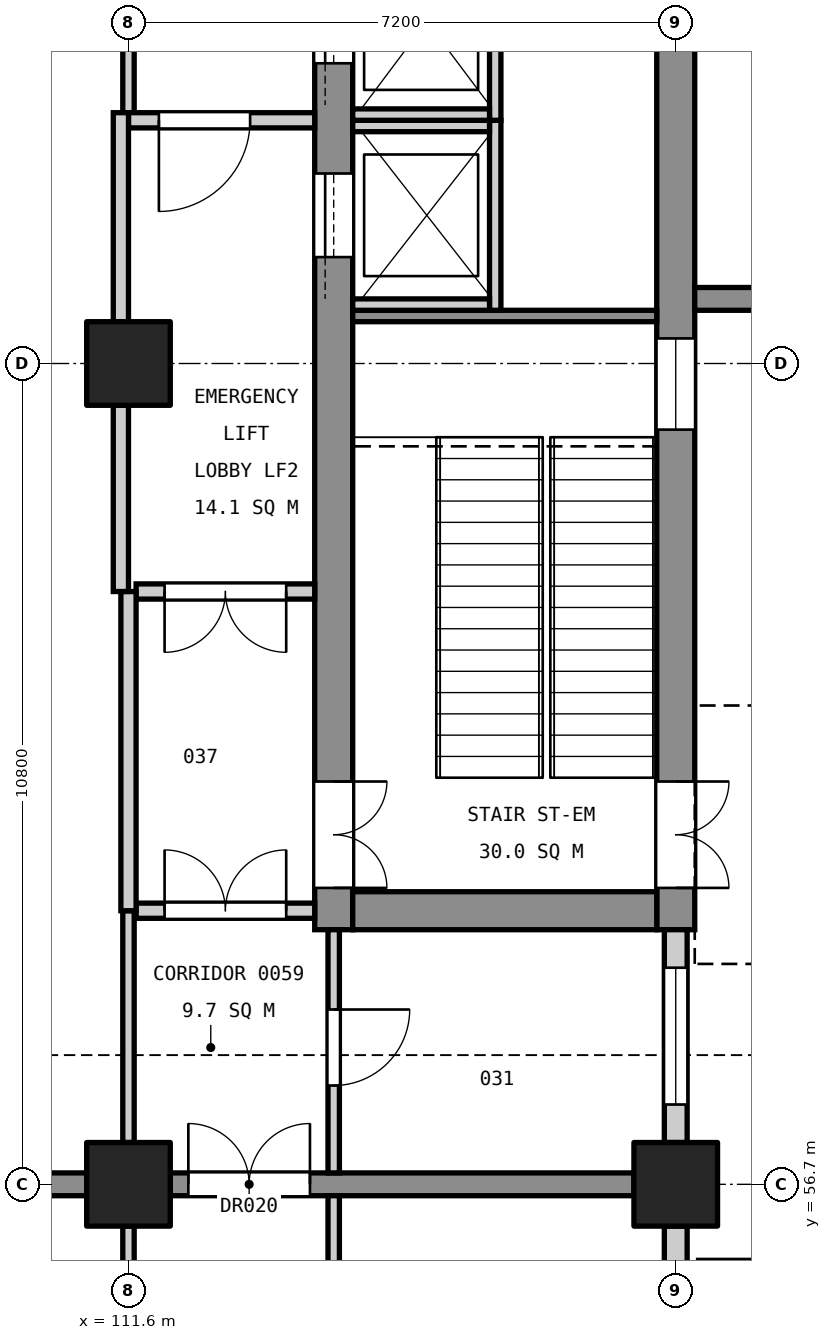
"""IFC4 building model, lengths in metres.
Left out: names, types, materials, properties, quantities, classifications, styles, units other than length and angle.
Written with IfcOpenShell. Run it as: python <this file> out.ifc"""

import sys

from ifc_helpers import new_model, si_unit, direction, frame, frame_2d, origin, origin_2d, place, context, subcontext, project, spatial, rectangle, extrude, element, fill, save


model = new_model("IFC4")
c1 = context("Model", 3, precision=1e-05, world=origin(), true_north=direction((0.0, 1.0)))
c2 = subcontext(c1, "Body", "Model", "MODEL_VIEW")
j1 = project(units=[si_unit("LENGTHUNIT", "METRE"), si_unit("PLANEANGLEUNIT", "RADIAN")], contexts=[c1])
p1 = place(None, origin())
s1 = spatial("IfcSite", under=j1, at=p1, CompositionType="ELEMENT")
p2 = place(p1, origin())
s2 = spatial("IfcBuilding", under=s1, at=p2, CompositionType="ELEMENT")
p3 = place(p2, origin())
s3 = spatial("IfcBuildingStorey", under=s2, at=p3, CompositionType="ELEMENT", Elevation=0.0)
for number, where, z_axis, x_axis in (
    (1, (118.8, 56.7, 0.0), (0.0, 0.0, 1.0), (1.0, 0.0, 0.0)),
    (2, (111.6, 56.7, 0.0), (0.0, 0.0, 1.0), (1.0, 0.0, 0.0)),
    (3, (111.6, 67.5, 0.0), (0.0, 0.0, 1.0), (1.0, 0.0, 0.0)),
):
    element("IfcColumn", number, at=place(p3, frame(where, z_axis=z_axis, x_axis=x_axis)), inside=s3, PredefinedType="COLUMN", context=c2, shape_type="SweptSolid", body=[
        extrude(rectangle(XDim=1.1, YDim=1.1, at=origin_2d()), origin(), (0.0, 0.0, 1.0), 6.0),
    ])
p4 = place(p3, frame((118.8, 60.05, 0.0), z_axis=(0.0, 0.0, 1.0), x_axis=(0.0, 1.0, 0.0)))
e4 = element("IfcWall", 4, at=p4, inside=s3, PredefinedType="SHEAR", context=c2, shape_type="SweptSolid", body=[
    extrude(rectangle(XDim=14.9, YDim=0.5, at=frame_2d((7.45, 0.0))), origin(), (0.0, 0.0, 1.0), 5.7),
])
p5 = place(p4, frame((0.55, 0.0, 0.0)))
e5 = element("IfcOpeningElement", 5, at=p5, cuts=e4, PredefinedType="OPENING", context=c2, shape_type="SweptSolid", body=[
    extrude(rectangle(XDim=1.4, YDim=2.1, at=frame_2d((0.7, 1.05))), frame((0.0, 0.26, 0.0), z_axis=(0.0, -1.0, 0.0), x_axis=(1.0, 0.0, 0.0)), (0.0, 0.0, 1.0), 0.52),
])
p6 = place(p4, frame((6.58, 0.0, 3.4)))
e6 = element("IfcOpeningElement", 6, at=p6, cuts=e4, PredefinedType="OPENING", context=c2, shape_type="SweptSolid", body=[
    extrude(rectangle(XDim=1.2, YDim=0.9, at=frame_2d((0.6, 0.45))), frame((0.0, 0.26, 0.0), z_axis=(0.0, -1.0, 0.0), x_axis=(1.0, 0.0, 0.0)), (0.0, 0.0, 1.0), 0.52),
])
p7 = place(p3, frame((114.3, 60.05, 0.0), z_axis=(0.0, 0.0, 1.0), x_axis=(0.0, 1.0, 0.0)))
e7 = element("IfcWall", 7, at=p7, inside=s3, PredefinedType="SHEAR", context=c2, shape_type="SweptSolid", body=[
    extrude(rectangle(XDim=14.9, YDim=0.5, at=frame_2d((7.45, 0.0))), origin(), (0.0, 0.0, 1.0), 5.7),
])
p8 = place(p7, frame((0.55, 0.0, 0.0)))
e8 = element("IfcOpeningElement", 8, at=p8, cuts=e7, PredefinedType="OPENING", context=c2, shape_type="SweptSolid", body=[
    extrude(rectangle(XDim=1.4, YDim=2.1, at=frame_2d((0.7, 1.05))), frame((0.0, 0.26, 0.0), z_axis=(0.0, -1.0, 0.0), x_axis=(1.0, 0.0, 0.0)), (0.0, 0.0, 1.0), 0.52),
])
p9 = place(p7, frame((8.85, 0.0, 0.0)))
e9 = element("IfcOpeningElement", 9, at=p9, cuts=e7, PredefinedType="OPENING", context=c2, shape_type="SweptSolid", body=[
    extrude(rectangle(XDim=1.1, YDim=2.1, at=frame_2d((0.55, 1.05))), frame((0.0, 0.26, 0.0), z_axis=(0.0, -1.0, 0.0), x_axis=(1.0, 0.0, 0.0)), (0.0, 0.0, 1.0), 0.52),
])
p10 = place(p7, frame((11.4, 0.0, 0.0)))
e10 = element("IfcOpeningElement", 10, at=p10, cuts=e7, PredefinedType="OPENING", context=c2, shape_type="SweptSolid", body=[
    extrude(rectangle(XDim=1.1, YDim=2.1, at=frame_2d((0.55, 1.05))), frame((0.0, 0.26, 0.0), z_axis=(0.0, -1.0, 0.0), x_axis=(1.0, 0.0, 0.0)), (0.0, 0.0, 1.0), 0.52),
])
p11 = place(p3, frame((118.55, 60.3, 0.0), z_axis=(0.0, 0.0, 1.0), x_axis=(-1.0, 0.0, 0.0)))
e11 = element("IfcWall", 11, at=p11, inside=s3, PredefinedType="SHEAR", context=c2, shape_type="SweptSolid", body=[
    extrude(rectangle(XDim=4.0, YDim=0.5, at=frame_2d((2.0, 0.0))), origin(), (0.0, 0.0, 1.0), 5.7),
])
p12 = place(p3, frame((119.05, 68.35, 0.0), z_axis=(0.0, 0.0, 1.0), x_axis=(1.0, 0.0, 0.0)))
e12 = element("IfcWall", 12, at=p12, inside=s3, PredefinedType="SHEAR", context=c2, shape_type="SweptSolid", body=[
    extrude(rectangle(XDim=1.25, YDim=0.3, at=frame_2d((0.625, 0.0))), origin(), (0.0, 0.0, 1.0), 6.0),
])
p13 = place(p3, frame((118.25, 56.7, 0.0), z_axis=(0.0, 0.0, 1.0), x_axis=(-1.0, 0.0, 0.0)))
e13 = element("IfcWall", 13, at=p13, inside=s3, PredefinedType="SHEAR", context=c2, shape_type="SweptSolid", body=[
    extrude(rectangle(XDim=6.1, YDim=0.3, at=frame_2d((3.05, 0.0))), origin(), (0.0, 0.0, 1.0), 5.7),
])
p14 = place(p13, frame((4.262, 0.0, 0.0)))
e14 = element("IfcOpeningElement", 14, at=p14, cuts=e13, PredefinedType="OPENING", context=c2, shape_type="SweptSolid", body=[
    extrude(rectangle(XDim=1.6, YDim=2.1, at=frame_2d((0.8, 1.05))), frame((0.0, 0.16, 0.0), z_axis=(0.0, -1.0, 0.0), x_axis=(1.0, 0.0, 0.0)), (0.0, 0.0, 1.0), 0.32),
])
p15 = place(p3, frame((111.05, 56.7, 0.0), z_axis=(0.0, 0.0, 1.0), x_axis=(-1.0, 0.0, 0.0)))
e15 = element("IfcWall", 15, at=p15, inside=s3, PredefinedType="SHEAR", context=c2, shape_type="SweptSolid", body=[
    extrude(rectangle(XDim=9.7, YDim=0.3, at=frame_2d((4.85, 0.0))), origin(), (0.0, 0.0, 1.0), 5.7),
])
p16 = place(p3, frame((118.55, 68.125, 0.0), z_axis=(0.0, 0.0, 1.0), x_axis=(-1.0, 0.0, 0.0)))
e16 = element("IfcWall", 16, at=p16, inside=s3, PredefinedType="SOLIDWALL", context=c2, shape_type="SweptSolid", body=[
    extrude(rectangle(XDim=4.0, YDim=0.15, at=frame_2d((2.0, 0.0))), origin(), (0.0, 0.0, 1.0), 5.7),
])
p17 = place(p3, frame((116.425, 68.2, 0.0), z_axis=(0.0, 0.0, 1.0), x_axis=(0.0, 1.0, 0.0)))
e17 = element("IfcWall", 17, at=p17, inside=s3, PredefinedType="SOLIDWALL", context=c2, shape_type="SweptSolid", body=[
    extrude(rectangle(XDim=2.5, YDim=0.15, at=frame_2d((1.25, 0.0))), origin(), (0.0, 0.0, 1.0), 6.0),
])
for number, where, z_axis, x_axis in (
    (18, (116.35, 68.275, 0.0), (0.0, 0.0, 1.0), (-1.0, 0.0, 0.0)),
    (19, (116.35, 70.625, 0.0), (0.0, 0.0, 1.0), (-1.0, 0.0, 0.0)),
):
    element("IfcWall", number, at=place(p3, frame(where, z_axis=z_axis, x_axis=x_axis)), inside=s3, PredefinedType="SOLIDWALL", context=c2, shape_type="SweptSolid", body=[
        extrude(rectangle(XDim=1.8, YDim=0.15, at=frame_2d((0.9, 0.0))), origin(), (0.0, 0.0, 1.0), 6.0),
    ])
p18 = place(p3, frame((116.425, 70.7, 0.0), z_axis=(0.0, 0.0, 1.0), x_axis=(0.0, 1.0, 0.0)))
e20 = element("IfcWall", 20, at=p18, inside=s3, PredefinedType="SOLIDWALL", context=c2, shape_type="SweptSolid", body=[
    extrude(rectangle(XDim=2.6, YDim=0.15, at=frame_2d((1.3, 0.0))), origin(), (0.0, 0.0, 1.0), 6.0),
])
p19 = place(p3, frame((116.35, 70.775, 0.0), z_axis=(0.0, 0.0, 1.0), x_axis=(-1.0, 0.0, 0.0)))
e21 = element("IfcWall", 21, at=p19, inside=s3, PredefinedType="SOLIDWALL", context=c2, shape_type="SweptSolid", body=[
    extrude(rectangle(XDim=1.8, YDim=0.15, at=frame_2d((0.9, 0.0))), origin(), (0.0, 0.0, 1.0), 6.0),
])
p20 = place(p3, frame((118.8, 46.15, 0.0), z_axis=(0.0, 0.0, 1.0), x_axis=(0.0, 1.0, 0.0)))
e22 = element("IfcWall", 22, at=p20, inside=s3, PredefinedType="STANDARD", context=c2, shape_type="SweptSolid", body=[
    extrude(rectangle(XDim=10.0, YDim=0.3, at=frame_2d((5.0, 0.0))), origin(), (0.0, 0.0, 1.0), 4.7),
])
p21 = place(p20, frame((0.775, 0.0, 0.9)))
e23 = element("IfcOpeningElement", 23, at=p21, cuts=e22, PredefinedType="OPENING", context=c2, shape_type="SweptSolid", body=[
    extrude(rectangle(XDim=1.8, YDim=3.0, at=frame_2d((0.9, 1.5))), frame((0.0, 0.16, 0.0), z_axis=(0.0, -1.0, 0.0), x_axis=(1.0, 0.0, 0.0)), (0.0, 0.0, 1.0), 0.32),
])
p22 = place(p20, frame((4.25, 0.0, 0.9)))
e24 = element("IfcOpeningElement", 24, at=p22, cuts=e22, PredefinedType="OPENING", context=c2, shape_type="SweptSolid", body=[
    extrude(rectangle(XDim=1.8, YDim=3.0, at=frame_2d((0.9, 1.5))), frame((0.0, 0.16, 0.0), z_axis=(0.0, -1.0, 0.0), x_axis=(1.0, 0.0, 0.0)), (0.0, 0.0, 1.0), 0.32),
])
p23 = place(p20, frame((7.575, 0.0, 0.9)))
e25 = element("IfcOpeningElement", 25, at=p23, cuts=e22, PredefinedType="OPENING", context=c2, shape_type="SweptSolid", body=[
    extrude(rectangle(XDim=1.8, YDim=3.0, at=frame_2d((0.9, 1.5))), frame((0.0, 0.16, 0.0), z_axis=(0.0, -1.0, 0.0), x_axis=(1.0, 0.0, 0.0)), (0.0, 0.0, 1.0), 0.32),
])
p24 = place(p3, frame((118.8, 57.25, 0.0), z_axis=(0.0, 0.0, 1.0), x_axis=(0.0, 1.0, 0.0)))
e26 = element("IfcWall", 26, at=p24, inside=s3, PredefinedType="STANDARD", context=c2, shape_type="SweptSolid", body=[
    extrude(rectangle(XDim=2.8, YDim=0.3, at=frame_2d((1.4, 0.0))), origin(), (0.0, 0.0, 1.0), 4.7),
])
p25 = place(p24, frame((0.5, 0.0, 0.9)))
e27 = element("IfcOpeningElement", 27, at=p25, cuts=e26, PredefinedType="OPENING", context=c2, shape_type="SweptSolid", body=[
    extrude(rectangle(XDim=1.8, YDim=3.0, at=frame_2d((0.9, 1.5))), frame((0.0, 0.16, 0.0), z_axis=(0.0, -1.0, 0.0), x_axis=(1.0, 0.0, 0.0)), (0.0, 0.0, 1.0), 0.32),
])
p26 = place(p3, frame((114.3, 46.15, 0.0), z_axis=(0.0, 0.0, 1.0), x_axis=(0.0, 1.0, 0.0)))
e28 = element("IfcWall", 28, at=p26, inside=s3, PredefinedType="PARTITIONING", context=c2, shape_type="SweptSolid", body=[
    extrude(rectangle(XDim=10.4, YDim=0.15, at=frame_2d((5.2, 0.0))), origin(), (0.0, 0.0, 1.0), 4.6),
])
p27 = place(p26, frame((4.65, 0.0, 0.0)))
e29 = element("IfcOpeningElement", 29, at=p27, cuts=e28, PredefinedType="OPENING", context=c2, shape_type="SweptSolid", body=[
    extrude(rectangle(XDim=1.0, YDim=2.1, at=frame_2d((0.5, 1.05))), frame((0.0, 0.085, 0.0), z_axis=(0.0, -1.0, 0.0), x_axis=(1.0, 0.0, 0.0)), (0.0, 0.0, 1.0), 0.17),
])
p28 = place(p26, frame((1.05, 0.0, 0.0)))
e30 = element("IfcOpeningElement", 30, at=p28, cuts=e28, PredefinedType="OPENING", context=c2, shape_type="SweptSolid", body=[
    extrude(rectangle(XDim=1.0, YDim=2.1, at=frame_2d((0.5, 1.05))), frame((0.0, 0.085, 0.0), z_axis=(0.0, -1.0, 0.0), x_axis=(1.0, 0.0, 0.0)), (0.0, 0.0, 1.0), 0.17),
])
p29 = place(p26, frame((8.25, 0.0, 0.0)))
e31 = element("IfcOpeningElement", 31, at=p29, cuts=e28, PredefinedType="OPENING", context=c2, shape_type="SweptSolid", body=[
    extrude(rectangle(XDim=1.0, YDim=2.1, at=frame_2d((0.5, 1.05))), frame((0.0, 0.085, 0.0), z_axis=(0.0, -1.0, 0.0), x_axis=(1.0, 0.0, 0.0)), (0.0, 0.0, 1.0), 0.17),
])
p30 = place(p3, frame((114.3, 56.85, 0.0), z_axis=(0.0, 0.0, 1.0), x_axis=(0.0, 1.0, 0.0)))
e32 = element("IfcWall", 32, at=p30, inside=s3, PredefinedType="PARTITIONING", context=c2, shape_type="SweptSolid", body=[
    extrude(rectangle(XDim=3.2, YDim=0.15, at=frame_2d((1.6, 0.0))), origin(), (0.0, 0.0, 1.0), 4.6),
])
p31 = place(p30, frame((1.15, 0.0, 0.0)))
e33 = element("IfcOpeningElement", 33, at=p31, cuts=e32, PredefinedType="OPENING", context=c2, shape_type="SweptSolid", body=[
    extrude(rectangle(XDim=1.0, YDim=2.1, at=frame_2d((0.5, 1.05))), frame((0.0, 0.085, 0.0), z_axis=(0.0, -1.0, 0.0), x_axis=(1.0, 0.0, 0.0)), (0.0, 0.0, 1.0), 0.17),
])
p32 = place(p3, frame((114.05, 60.3, 0.0), z_axis=(0.0, 0.0, 1.0), x_axis=(-1.0, 0.0, 0.0)))
e34 = element("IfcWall", 34, at=p32, inside=s3, PredefinedType="PARTITIONING", context=c2, shape_type="SweptSolid", body=[
    extrude(rectangle(XDim=2.35, YDim=0.2, at=frame_2d((1.175, 0.0))), origin(), (0.0, 0.0, 1.0), 4.9),
])
p33 = place(p32, frame((0.375, 0.0, 0.0)))
e35 = element("IfcOpeningElement", 35, at=p33, cuts=e34, PredefinedType="OPENING", context=c2, shape_type="SweptSolid", body=[
    extrude(rectangle(XDim=1.6, YDim=2.1, at=frame_2d((0.8, 1.05))), frame((0.0, 0.11, 0.0), z_axis=(0.0, -1.0, 0.0), x_axis=(1.0, 0.0, 0.0)), (0.0, 0.0, 1.0), 0.22),
])
p34 = place(p3, frame((114.05, 64.5, 0.0), z_axis=(0.0, 0.0, 1.0), x_axis=(-1.0, 0.0, 0.0)))
e36 = element("IfcWall", 36, at=p34, inside=s3, PredefinedType="PARTITIONING", context=c2, shape_type="SweptSolid", body=[
    extrude(rectangle(XDim=2.35, YDim=0.2, at=frame_2d((1.175, 0.0))), origin(), (0.0, 0.0, 1.0), 4.6),
])
p35 = place(p34, frame((0.375, 0.0, 0.0)))
e37 = element("IfcOpeningElement", 37, at=p35, cuts=e36, PredefinedType="OPENING", context=c2, shape_type="SweptSolid", body=[
    extrude(rectangle(XDim=1.6, YDim=2.1, at=frame_2d((0.8, 1.05))), frame((0.0, 0.11, 0.0), z_axis=(0.0, -1.0, 0.0), x_axis=(1.0, 0.0, 0.0)), (0.0, 0.0, 1.0), 0.22),
])
p36 = place(p3, frame((111.6, 46.45, 0.0), z_axis=(0.0, 0.0, 1.0), x_axis=(0.0, 1.0, 0.0)))
e38 = element("IfcWall", 38, at=p36, inside=s3, PredefinedType="PARTITIONING", context=c2, shape_type="SweptSolid", body=[
    extrude(rectangle(XDim=9.7, YDim=0.15, at=frame_2d((4.85, 0.0))), origin(), (0.0, 0.0, 1.0), 4.6),
])
p37 = place(p36, frame((4.25, 0.0, 0.0)))
e39 = element("IfcOpeningElement", 39, at=p37, cuts=e38, PredefinedType="OPENING", context=c2, shape_type="SweptSolid", body=[
    extrude(rectangle(XDim=1.2, YDim=2.1, at=frame_2d((0.6, 1.05))), frame((0.0, 0.085, 0.0), z_axis=(0.0, -1.0, 0.0), x_axis=(1.0, 0.0, 0.0)), (0.0, 0.0, 1.0), 0.17),
])
p38 = place(p36, frame((0.925, 0.0, 0.0)))
e40 = element("IfcOpeningElement", 40, at=p38, cuts=e38, PredefinedType="OPENING", context=c2, shape_type="SweptSolid", body=[
    extrude(rectangle(XDim=1.2, YDim=2.1, at=frame_2d((0.6, 1.05))), frame((0.0, 0.085, 0.0), z_axis=(0.0, -1.0, 0.0), x_axis=(1.0, 0.0, 0.0)), (0.0, 0.0, 1.0), 0.17),
])
p39 = place(p36, frame((7.575, 0.0, 0.0)))
e41 = element("IfcOpeningElement", 41, at=p39, cuts=e38, PredefinedType="OPENING", context=c2, shape_type="SweptSolid", body=[
    extrude(rectangle(XDim=1.2, YDim=2.1, at=frame_2d((0.6, 1.05))), frame((0.0, 0.085, 0.0), z_axis=(0.0, -1.0, 0.0), x_axis=(1.0, 0.0, 0.0)), (0.0, 0.0, 1.0), 0.17),
])
p40 = place(p3, frame((111.6, 57.25, 0.0), z_axis=(0.0, 0.0, 1.0), x_axis=(0.0, 1.0, 0.0)))
e42 = element("IfcWall", 42, at=p40, inside=s3, PredefinedType="PARTITIONING", context=c2, shape_type="SweptSolid", body=[
    extrude(rectangle(XDim=3.05, YDim=0.15, at=frame_2d((1.525, 0.0))), origin(), (0.0, 0.0, 1.0), 4.6),
])
p41 = place(p3, frame((111.6, 60.3, 0.0), z_axis=(0.0, 0.0, 1.0), x_axis=(0.0, 1.0, 0.0)))
e43 = element("IfcWall", 43, at=p41, inside=s3, PredefinedType="PARTITIONING", context=c2, shape_type="SweptSolid", body=[
    extrude(rectangle(XDim=4.2, YDim=0.2, at=frame_2d((2.1, 0.0))), origin(), (0.0, 0.0, 1.0), 4.6),
])
p42 = place(p3, frame((111.6, 70.8, 0.0), z_axis=(0.0, 0.0, 1.0), x_axis=(0.0, 1.0, 0.0)))
e44 = element("IfcWall", 44, at=p42, inside=s3, PredefinedType="PARTITIONING", context=c2, shape_type="SweptSolid", body=[
    extrude(rectangle(XDim=6.95, YDim=0.15, at=frame_2d((3.475, 0.0))), origin(), (0.0, 0.0, 1.0), 4.6),
])
p43 = place(p42, frame((2.975, 0.0, 0.0)))
e45 = element("IfcOpeningElement", 45, at=p43, cuts=e44, PredefinedType="OPENING", context=c2, shape_type="SweptSolid", body=[
    extrude(rectangle(XDim=1.0, YDim=2.1, at=frame_2d((0.5, 1.05))), frame((0.0, 0.085, 0.0), z_axis=(0.0, -1.0, 0.0), x_axis=(1.0, 0.0, 0.0)), (0.0, 0.0, 1.0), 0.17),
])
p44 = place(p3, frame((114.05, 70.7, 0.0), z_axis=(0.0, 0.0, 1.0), x_axis=(-1.0, 0.0, 0.0)))
e46 = element("IfcWall", 46, at=p44, inside=s3, PredefinedType="PARTITIONING", context=c2, shape_type="SweptSolid", body=[
    extrude(rectangle(XDim=2.45, YDim=0.2, at=frame_2d((1.225, 0.0))), origin(), (0.0, 0.0, 1.0), 4.6),
])
p45 = place(p44, frame((0.85, 0.0, 0.0)))
e47 = element("IfcOpeningElement", 47, at=p45, cuts=e46, PredefinedType="OPENING", context=c2, shape_type="SweptSolid", body=[
    extrude(rectangle(XDim=1.2, YDim=2.1, at=frame_2d((0.6, 1.05))), frame((0.0, 0.11, 0.0), z_axis=(0.0, -1.0, 0.0), x_axis=(1.0, 0.0, 0.0)), (0.0, 0.0, 1.0), 0.22),
])
p46 = place(p3, frame((111.5, 64.5, 0.0), z_axis=(0.0, 0.0, 1.0), x_axis=(0.0, 1.0, 0.0)))
e48 = element("IfcWall", 48, at=p46, inside=s3, PredefinedType="PARTITIONING", context=c2, shape_type="SweptSolid", body=[
    extrude(rectangle(XDim=2.45, YDim=0.2, at=frame_2d((1.225, 0.0))), origin(), (0.0, 0.0, 1.0), 4.6),
])
p47 = place(p3, frame((111.5, 68.05, 0.0), z_axis=(0.0, 0.0, 1.0), x_axis=(0.0, 1.0, 0.0)))
e49 = element("IfcWall", 49, at=p47, inside=s3, PredefinedType="PARTITIONING", context=c2, shape_type="SweptSolid", body=[
    extrude(rectangle(XDim=2.75, YDim=0.2, at=frame_2d((1.375, 0.0))), origin(), (0.0, 0.0, 1.0), 4.6),
])
p48 = place(p3, frame((119.1, 55.6, 0.0), z_axis=(0.0, 0.0, 1.0), x_axis=(1.0, 0.0, 0.0)))
e50 = element("IfcWall", 50, at=p48, inside=s3, PredefinedType="SOLIDWALL", context=c2, shape_type="SweptSolid", body=[
    extrude(rectangle(XDim=4.4, YDim=0.2, at=frame_2d((2.2, 0.0))), origin(), (0.0, 0.0, 1.0), 3.3),
])
p49 = place(p8, frame((1.4, 0.0, 0.0), z_axis=(0.0, 0.0, 1.0), x_axis=(-1.0, 0.0, 0.0)))
e51 = element("IfcDoor", 51, at=p49, inside=s3, OperationType="DOUBLE_DOOR_SINGLE_SWING", PredefinedType="DOOR", context=c2, shape_type="SweptSolid", body=[
    extrude(rectangle(XDim=1.4, YDim=2.1, at=frame_2d((0.7, 1.05))), frame((0.0, 0.025, 0.0), z_axis=(0.0, -1.0, 0.0), x_axis=(1.0, 0.0, 0.0)), (0.0, 0.0, 1.0), 0.05),
])
fill(e8, e51)
p50 = place(p5, frame((1.4, 0.0, 0.0), z_axis=(0.0, 0.0, 1.0), x_axis=(-1.0, 0.0, 0.0)))
e52 = element("IfcDoor", 52, at=p50, inside=s3, OperationType="DOUBLE_DOOR_SINGLE_SWING", PredefinedType="DOOR", context=c2, shape_type="SweptSolid", body=[
    extrude(rectangle(XDim=1.4, YDim=2.1, at=frame_2d((0.7, 1.05))), frame((0.0, 0.025, 0.0), z_axis=(0.0, -1.0, 0.0), x_axis=(1.0, 0.0, 0.0)), (0.0, 0.0, 1.0), 0.05),
])
fill(e5, e52)
p51 = place(p9, origin())
e53 = element("IfcDoor", 53, at=p51, inside=s3, OperationType="SLIDING_TO_LEFT", PredefinedType="DOOR", context=c2, shape_type="SweptSolid", body=[
    extrude(rectangle(XDim=1.1, YDim=2.1, at=frame_2d((0.55, 1.05))), frame((0.0, 0.025, 0.0), z_axis=(0.0, -1.0, 0.0), x_axis=(1.0, 0.0, 0.0)), (0.0, 0.0, 1.0), 0.05),
])
fill(e9, e53)
p52 = place(p10, origin())
e54 = element("IfcDoor", 54, at=p52, inside=s3, OperationType="SLIDING_TO_LEFT", PredefinedType="DOOR", context=c2, shape_type="SweptSolid", body=[
    extrude(rectangle(XDim=1.1, YDim=2.1, at=frame_2d((0.55, 1.05))), frame((0.0, 0.025, 0.0), z_axis=(0.0, -1.0, 0.0), x_axis=(1.0, 0.0, 0.0)), (0.0, 0.0, 1.0), 0.05),
])
fill(e10, e54)
p53 = place(p25, origin())
e55 = element("IfcWindow", 55, at=p53, inside=s3, PartitioningType="SINGLE_PANEL", PredefinedType="WINDOW", context=c2, shape_type="SweptSolid", body=[
    extrude(rectangle(XDim=1.8, YDim=3.0, at=frame_2d((0.9, 1.5))), frame((0.0, 0.03, 0.0), z_axis=(0.0, -1.0, 0.0), x_axis=(1.0, 0.0, 0.0)), (0.0, 0.0, 1.0), 0.06),
])
fill(e27, e55)
p54 = place(p6, origin())
e56 = element("IfcWindow", 56, at=p54, inside=s3, PartitioningType="SINGLE_PANEL", PredefinedType="WINDOW", context=c2, shape_type="SweptSolid", body=[
    extrude(rectangle(XDim=1.2, YDim=0.9, at=frame_2d((0.6, 0.45))), frame((0.0, 0.03, 0.0), z_axis=(0.0, -1.0, 0.0), x_axis=(1.0, 0.0, 0.0)), (0.0, 0.0, 1.0), 0.06),
])
fill(e6, e56)
p55 = place(p31, frame((1.0, 0.0, 0.0), z_axis=(0.0, 0.0, 1.0), x_axis=(-1.0, 0.0, 0.0)))
e57 = element("IfcDoor", 57, at=p55, inside=s3, OperationType="SINGLE_SWING_LEFT", PredefinedType="DOOR", context=c2, shape_type="SweptSolid", body=[
    extrude(rectangle(XDim=1.0, YDim=2.1, at=frame_2d((0.5, 1.05))), frame((0.0, 0.025, 0.0), z_axis=(0.0, -1.0, 0.0), x_axis=(1.0, 0.0, 0.0)), (0.0, 0.0, 1.0), 0.05),
])
fill(e33, e57)
p56 = place(p45, origin())
e58 = element("IfcDoor", 58, at=p56, inside=s3, OperationType="SINGLE_SWING_RIGHT", PredefinedType="DOOR", context=c2, shape_type="SweptSolid", body=[
    extrude(rectangle(XDim=1.2, YDim=2.1, at=frame_2d((0.6, 1.05))), frame((0.0, 0.025, 0.0), z_axis=(0.0, -1.0, 0.0), x_axis=(1.0, 0.0, 0.0)), (0.0, 0.0, 1.0), 0.05),
])
fill(e47, e58)
p57 = place(p33, frame((1.6, 0.0, 0.0), z_axis=(0.0, 0.0, 1.0), x_axis=(-1.0, 0.0, 0.0)))
e59 = element("IfcDoor", 59, at=p57, inside=s3, OperationType="DOUBLE_DOOR_SINGLE_SWING", PredefinedType="DOOR", context=c2, shape_type="SweptSolid", body=[
    extrude(rectangle(XDim=1.6, YDim=2.1, at=frame_2d((0.8, 1.05))), frame((0.0, 0.025, 0.0), z_axis=(0.0, -1.0, 0.0), x_axis=(1.0, 0.0, 0.0)), (0.0, 0.0, 1.0), 0.05),
])
fill(e35, e59)
p58 = place(p35, origin())
e60 = element("IfcDoor", 60, at=p58, inside=s3, OperationType="DOUBLE_DOOR_SINGLE_SWING", PredefinedType="DOOR", context=c2, shape_type="SweptSolid", body=[
    extrude(rectangle(XDim=1.6, YDim=2.1, at=frame_2d((0.8, 1.05))), frame((0.0, 0.025, 0.0), z_axis=(0.0, -1.0, 0.0), x_axis=(1.0, 0.0, 0.0)), (0.0, 0.0, 1.0), 0.05),
])
fill(e37, e60)
p59 = place(p14, frame((1.6, 0.0, 0.0), z_axis=(0.0, 0.0, 1.0), x_axis=(-1.0, 0.0, 0.0)))
e61 = element("IfcDoor", 61, at=p59, inside=s3, OperationType="DOUBLE_DOOR_SINGLE_SWING", PredefinedType="DOOR", context=c2, shape_type="SweptSolid", body=[
    extrude(rectangle(XDim=1.6, YDim=2.1, at=frame_2d((0.8, 1.05))), frame((0.0, 0.025, 0.0), z_axis=(0.0, -1.0, 0.0), x_axis=(1.0, 0.0, 0.0)), (0.0, 0.0, 1.0), 0.05),
])
fill(e14, e61)
save(model, sys.argv[1])
